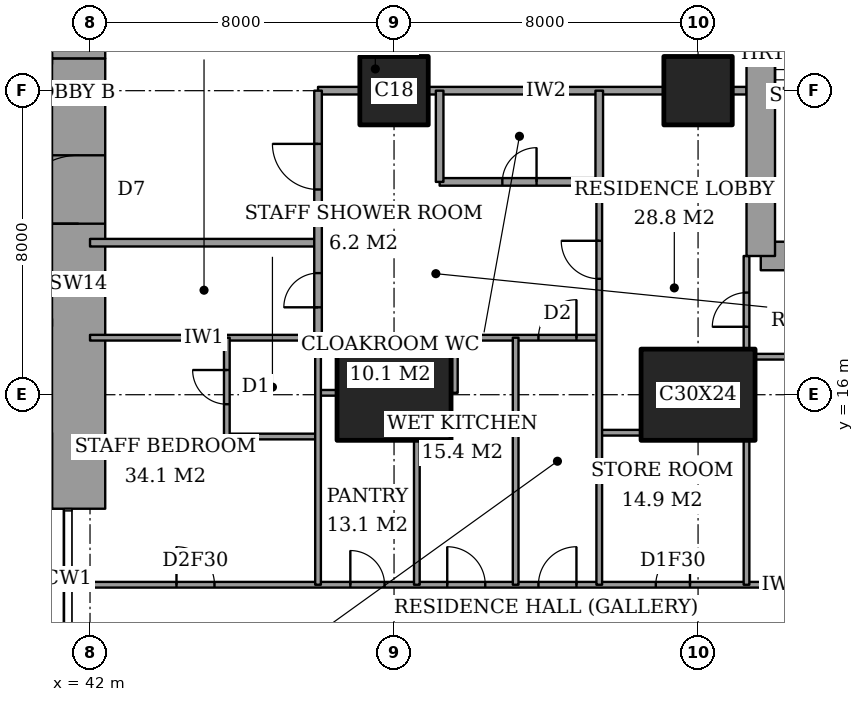
"""IFC4 building model, lengths in metres.
Left out: names, types, materials, properties, quantities, classifications, styles, units other than length and angle.
Written with IfcOpenShell. Run it as: python <this file> out.ifc"""

import sys

from ifc_helpers import new_model, si_unit, direction, frame, frame_2d, origin, origin_2d, place, context, subcontext, project, spatial, rectangle, extrude, element, fill, save


model = new_model("IFC4")
c1 = context("Model", 3, precision=1e-05, world=origin(), true_north=direction((0.0, 1.0)))
c2 = subcontext(c1, "Body", "Model", "MODEL_VIEW")
j1 = project(units=[si_unit("LENGTHUNIT", "METRE"), si_unit("PLANEANGLEUNIT", "RADIAN")], contexts=[c1])
p1 = place(None, origin())
s1 = spatial("IfcSite", under=j1, at=p1, CompositionType="ELEMENT")
p2 = place(p1, origin())
s2 = spatial("IfcBuilding", under=s1, at=p2, CompositionType="ELEMENT")
p3 = place(p2, frame((0.0, 0.0, 214.6)))
s3 = spatial("IfcBuildingStorey", under=s2, at=p3, CompositionType="ELEMENT", Elevation=214.6)
p4 = place(p3, frame((50.0, 16.0, 0.0), z_axis=(0.0, 0.0, 1.0), x_axis=(1.0, 0.0, 0.0)))
e1 = element("IfcColumn", 1, at=p4, inside=s3, PredefinedType="COLUMN", context=c2, shape_type="SweptSolid", body=[
    extrude(rectangle(XDim=3.0, YDim=2.4, at=origin_2d()), origin(), (0.0, 0.0, 1.0), 3.6),
])
p5 = place(p3, frame((50.0, 24.0, 0.0), z_axis=(0.0, 0.0, 1.0), x_axis=(1.0, 0.0, 0.0)))
e2 = element("IfcColumn", 2, at=p5, inside=s3, PredefinedType="COLUMN", context=c2, shape_type="SweptSolid", body=[
    extrude(rectangle(XDim=1.8, YDim=1.8, at=origin_2d()), origin(), (0.0, 0.0, 1.0), 3.6),
])
p6 = place(p3, frame((58.0, 16.0, 0.0), z_axis=(0.0, 0.0, 1.0), x_axis=(1.0, 0.0, 0.0)))
e3 = element("IfcColumn", 3, at=p6, inside=s3, PredefinedType="COLUMN", context=c2, shape_type="SweptSolid", body=[
    extrude(rectangle(XDim=3.0, YDim=2.4, at=origin_2d()), origin(), (0.0, 0.0, 1.0), 3.6),
])
p7 = place(p3, frame((58.0, 24.0, 0.0), z_axis=(0.0, 0.0, 1.0), x_axis=(1.0, 0.0, 0.0)))
e4 = element("IfcColumn", 4, at=p7, inside=s3, PredefinedType="COLUMN", context=c2, shape_type="SweptSolid", body=[
    extrude(rectangle(XDim=1.8, YDim=1.8, at=origin_2d()), origin(), (0.0, 0.0, 1.0), 3.6),
])
p8 = place(p3, frame((41.7, 13.0, 0.0), z_axis=(0.0, 0.0, 1.0), x_axis=(0.0, 1.0, 0.0)))
e5 = element("IfcWall", 5, at=p8, inside=s3, PredefinedType="SHEAR", context=c2, shape_type="SweptSolid", body=[
    extrude(rectangle(XDim=11.85, YDim=1.4, at=frame_2d((5.925, 0.0))), origin(), (0.0, 0.0, 1.0), 3.6),
])
p9 = place(p8, frame((7.5, 0.0, 0.0)))
e6 = element("IfcOpeningElement", 6, at=p9, cuts=e5, PredefinedType="OPENING", context=c2, shape_type="SweptSolid", body=[
    extrude(rectangle(XDim=1.8, YDim=2.4, at=frame_2d((0.9, 1.2))), frame((0.0, 0.71, 0.0), z_axis=(0.0, -1.0, 0.0), x_axis=(1.0, 0.0, 0.0)), (0.0, 0.0, 1.0), 1.42),
])
p10 = place(p3, frame((41.7, 24.85, 0.0), z_axis=(0.0, 0.0, 1.0), x_axis=(0.0, 1.0, 0.0)))
e7 = element("IfcWall", 7, at=p10, inside=s3, PredefinedType="SHEAR", context=c2, shape_type="SweptSolid", body=[
    extrude(rectangle(XDim=10.15, YDim=1.4, at=frame_2d((5.075, 0.0))), origin(), (0.0, 0.0, 1.0), 3.6),
])
p11 = place(p3, frame((59.65, 19.65, 0.0), z_axis=(0.0, 0.0, 1.0), x_axis=(1.0, 0.0, 0.0)))
e8 = element("IfcWall", 8, at=p11, inside=s3, PredefinedType="SHEAR", context=c2, shape_type="SweptSolid", body=[
    extrude(rectangle(XDim=4.45, YDim=0.75, at=frame_2d((2.225, 0.0))), origin(), (0.0, 0.0, 1.0), 3.6),
])
p12 = place(p3, frame((59.65, 28.35, 0.0), z_axis=(0.0, 0.0, 1.0), x_axis=(0.0, -1.0, 0.0)))
e9 = element("IfcWall", 9, at=p12, inside=s3, PredefinedType="SHEAR", context=c2, shape_type="SweptSolid", body=[
    extrude(rectangle(XDim=8.7, YDim=0.75, at=frame_2d((4.35, 0.0))), origin(), (0.0, 0.0, 1.0), 3.6),
])
p13 = place(p12, frame((0.975, 0.0, 0.0)))
e10 = element("IfcOpeningElement", 10, at=p13, cuts=e9, PredefinedType="OPENING", context=c2, shape_type="SweptSolid", body=[
    extrude(rectangle(XDim=1.0, YDim=2.1, at=frame_2d((0.5, 1.05))), frame((0.0, 0.385, 0.0), z_axis=(0.0, -1.0, 0.0), x_axis=(1.0, 0.0, 0.0)), (0.0, 0.0, 1.0), 0.77),
])
p14 = place(p3, frame((41.439, 11.0, 0.0), z_axis=(0.0, 0.0, 1.0), x_axis=(1.0, 0.0, 0.0)))
e11 = element("IfcWall", 11, at=p14, inside=s3, PredefinedType="PARTITIONING", context=c2, shape_type="SweptSolid", body=[
    extrude(rectangle(XDim=25.011, YDim=0.15, at=frame_2d((12.505, 0.0))), origin(), (0.0, 0.0, 1.0), 3.35),
])
p15 = place(p14, frame((12.361, 0.0, 0.0)))
e12 = element("IfcOpeningElement", 12, at=p15, cuts=e11, PredefinedType="OPENING", context=c2, shape_type="SweptSolid", body=[
    extrude(rectangle(XDim=1.0, YDim=2.1, at=frame_2d((0.5, 1.05))), frame((0.0, 0.085, 0.0), z_axis=(0.0, -1.0, 0.0), x_axis=(1.0, 0.0, 0.0)), (0.0, 0.0, 1.0), 0.17),
])
p16 = place(p14, frame((20.924, 0.0, 0.0)))
e13 = element("IfcOpeningElement", 13, at=p16, cuts=e11, PredefinedType="OPENING", context=c2, shape_type="SweptSolid", body=[
    extrude(rectangle(XDim=1.0, YDim=2.1, at=frame_2d((0.5, 1.05))), frame((0.0, 0.085, 0.0), z_axis=(0.0, -1.0, 0.0), x_axis=(1.0, 0.0, 0.0)), (0.0, 0.0, 1.0), 0.17),
])
p17 = place(p14, frame((15.448, 0.0, 0.0)))
e14 = element("IfcOpeningElement", 14, at=p17, cuts=e11, PredefinedType="OPENING", context=c2, shape_type="SweptSolid", body=[
    extrude(rectangle(XDim=0.9, YDim=2.1, at=frame_2d((0.45, 1.05))), frame((0.0, 0.085, 0.0), z_axis=(0.0, -1.0, 0.0), x_axis=(1.0, 0.0, 0.0)), (0.0, 0.0, 1.0), 0.17),
])
p18 = place(p14, frame((9.961, 0.0, 0.0)))
e15 = element("IfcOpeningElement", 15, at=p18, cuts=e11, PredefinedType="OPENING", context=c2, shape_type="SweptSolid", body=[
    extrude(rectangle(XDim=1.0, YDim=2.1, at=frame_2d((0.5, 1.05))), frame((0.0, 0.085, 0.0), z_axis=(0.0, -1.0, 0.0), x_axis=(1.0, 0.0, 0.0)), (0.0, 0.0, 1.0), 0.17),
])
p19 = place(p14, frame((7.411, 0.0, 0.0)))
e16 = element("IfcOpeningElement", 16, at=p19, cuts=e11, PredefinedType="OPENING", context=c2, shape_type="SweptSolid", body=[
    extrude(rectangle(XDim=0.9, YDim=2.1, at=frame_2d((0.45, 1.05))), frame((0.0, 0.085, 0.0), z_axis=(0.0, -1.0, 0.0), x_axis=(1.0, 0.0, 0.0)), (0.0, 0.0, 1.0), 0.17),
])
p20 = place(p14, frame((2.836, 0.0, 0.0)))
e17 = element("IfcOpeningElement", 17, at=p20, cuts=e11, PredefinedType="OPENING", context=c2, shape_type="SweptSolid", body=[
    extrude(rectangle(XDim=1.0, YDim=2.1, at=frame_2d((0.5, 1.05))), frame((0.0, 0.085, 0.0), z_axis=(0.0, -1.0, 0.0), x_axis=(1.0, 0.0, 0.0)), (0.0, 0.0, 1.0), 0.17),
])
p21 = place(p3, frame((45.6, 14.9, 0.0), z_axis=(0.0, 0.0, 1.0), x_axis=(1.0, 0.0, 0.0)))
e18 = element("IfcWall", 18, at=p21, inside=s3, PredefinedType="PARTITIONING", context=c2, shape_type="SweptSolid", body=[
    extrude(rectangle(XDim=2.4, YDim=0.15, at=frame_2d((1.2, 0.0))), origin(), (0.0, 0.0, 1.0), 3.35),
])
p22 = place(p3, frame((55.4, 15.0, 0.0), z_axis=(0.0, 0.0, 1.0), x_axis=(1.0, 0.0, 0.0)))
e19 = element("IfcWall", 19, at=p22, inside=s3, PredefinedType="PARTITIONING", context=c2, shape_type="SweptSolid", body=[
    extrude(rectangle(XDim=1.1, YDim=0.15, at=frame_2d((0.55, 0.0))), origin(), (0.0, 0.0, 1.0), 3.35),
])
p23 = place(p3, frame((48.0, 16.05, 0.0), z_axis=(0.0, 0.0, 1.0), x_axis=(1.0, 0.0, 0.0)))
e20 = element("IfcWall", 20, at=p23, inside=s3, PredefinedType="PARTITIONING", context=c2, shape_type="SweptSolid", body=[
    extrude(rectangle(XDim=0.5, YDim=0.15, at=frame_2d((0.25, 0.0))), origin(), (0.0, 0.0, 1.0), 2.634),
])
p24 = place(p3, frame((59.5, 17.0, 0.0), z_axis=(0.0, 0.0, 1.0), x_axis=(1.0, 0.0, 0.0)))
e21 = element("IfcWall", 21, at=p24, inside=s3, PredefinedType="PARTITIONING", context=c2, shape_type="SweptSolid", body=[
    extrude(rectangle(XDim=6.95, YDim=0.15, at=frame_2d((3.475, 0.0))), origin(), (0.0, 0.0, 1.0), 3.35),
])
p25 = place(p3, frame((42.0, 17.5, 0.0), z_axis=(0.0, 0.0, 1.0), x_axis=(1.0, 0.0, 0.0)))
e22 = element("IfcWall", 22, at=p25, inside=s3, PredefinedType="PARTITIONING", context=c2, shape_type="SweptSolid", body=[
    extrude(rectangle(XDim=6.0, YDim=0.15, at=frame_2d((3.0, 0.0))), origin(), (0.0, 0.0, 1.0), 3.35),
])
p26 = place(p3, frame((51.6, 17.5, 0.0), z_axis=(0.0, 0.0, 1.0), x_axis=(1.0, 0.0, 0.0)))
e23 = element("IfcWall", 23, at=p26, inside=s3, PredefinedType="PARTITIONING", context=c2, shape_type="SweptSolid", body=[
    extrude(rectangle(XDim=3.8, YDim=0.15, at=frame_2d((1.9, 0.0))), origin(), (0.0, 0.0, 1.0), 3.35),
])
p27 = place(p26, frame((2.2, 0.0, 0.0)))
e24 = element("IfcOpeningElement", 24, at=p27, cuts=e23, PredefinedType="OPENING", context=c2, shape_type="SweptSolid", body=[
    extrude(rectangle(XDim=1.0, YDim=2.1, at=frame_2d((0.5, 1.05))), frame((0.0, 0.085, 0.0), z_axis=(0.0, -1.0, 0.0), x_axis=(1.0, 0.0, 0.0)), (0.0, 0.0, 1.0), 0.17),
])
p28 = place(p3, frame((42.0, 20.0, 0.0), z_axis=(0.0, 0.0, 1.0), x_axis=(1.0, 0.0, 0.0)))
e25 = element("IfcWall", 25, at=p28, inside=s3, PredefinedType="PARTITIONING", context=c2, shape_type="SweptSolid", body=[
    extrude(rectangle(XDim=6.0, YDim=0.2, at=frame_2d((3.0, 0.0))), origin(), (0.0, 0.0, 1.0), 3.35),
])
p29 = place(p3, frame((51.2, 21.6, 0.0), z_axis=(0.0, 0.0, 1.0), x_axis=(1.0, 0.0, 0.0)))
e26 = element("IfcWall", 26, at=p29, inside=s3, PredefinedType="PARTITIONING", context=c2, shape_type="SweptSolid", body=[
    extrude(rectangle(XDim=4.2, YDim=0.2, at=frame_2d((2.1, 0.0))), origin(), (0.0, 0.0, 1.0), 3.35),
])
p30 = place(p29, frame((1.65, 0.0, 0.0)))
e27 = element("IfcOpeningElement", 27, at=p30, cuts=e26, PredefinedType="OPENING", context=c2, shape_type="SweptSolid", body=[
    extrude(rectangle(XDim=0.9, YDim=2.1, at=frame_2d((0.45, 1.05))), frame((0.0, 0.11, 0.0), z_axis=(0.0, -1.0, 0.0), x_axis=(1.0, 0.0, 0.0)), (0.0, 0.0, 1.0), 0.22),
])
p31 = place(p3, frame((48.0, 24.0, 0.0), z_axis=(0.0, 0.0, 1.0), x_axis=(1.0, 0.0, 0.0)))
e28 = element("IfcWall", 28, at=p31, inside=s3, PredefinedType="PARTITIONING", context=c2, shape_type="SweptSolid", body=[
    extrude(rectangle(XDim=1.1, YDim=0.2, at=frame_2d((0.55, 0.0))), origin(), (0.0, 0.0, 1.0), 3.35),
])
p32 = place(p3, frame((50.9, 24.0, 0.0), z_axis=(0.0, 0.0, 1.0), x_axis=(1.0, 0.0, 0.0)))
e29 = element("IfcWall", 29, at=p32, inside=s3, PredefinedType="PARTITIONING", context=c2, shape_type="SweptSolid", body=[
    extrude(rectangle(XDim=6.2, YDim=0.2, at=frame_2d((3.1, 0.0))), origin(), (0.0, 0.0, 1.0), 3.35),
])
p33 = place(p3, frame((58.9, 24.0, 0.0), z_axis=(0.0, 0.0, 1.0), x_axis=(1.0, 0.0, 0.0)))
e30 = element("IfcWall", 30, at=p33, inside=s3, PredefinedType="PARTITIONING", context=c2, shape_type="SweptSolid", body=[
    extrude(rectangle(XDim=0.375, YDim=0.2, at=frame_2d((0.188, 0.0))), origin(), (0.0, 0.0, 1.0), 3.35),
])
p34 = place(p3, frame((45.6, 14.9, 0.0), z_axis=(0.0, 0.0, 1.0), x_axis=(0.0, 1.0, 0.0)))
e31 = element("IfcWall", 31, at=p34, inside=s3, PredefinedType="PARTITIONING", context=c2, shape_type="SweptSolid", body=[
    extrude(rectangle(XDim=2.6, YDim=0.15, at=frame_2d((1.3, 0.0))), origin(), (0.0, 0.0, 1.0), 3.35),
])
p35 = place(p34, frame((0.85, 0.0, 0.0)))
e32 = element("IfcOpeningElement", 32, at=p35, cuts=e31, PredefinedType="OPENING", context=c2, shape_type="SweptSolid", body=[
    extrude(rectangle(XDim=0.9, YDim=2.1, at=frame_2d((0.45, 1.05))), frame((0.0, 0.085, 0.0), z_axis=(0.0, -1.0, 0.0), x_axis=(1.0, 0.0, 0.0)), (0.0, 0.0, 1.0), 0.17),
])
p36 = place(p3, frame((48.0, 17.5, 0.0), z_axis=(0.0, 0.0, 1.0), x_axis=(0.0, 1.0, 0.0)))
e33 = element("IfcWall", 33, at=p36, inside=s3, PredefinedType="PARTITIONING", context=c2, shape_type="SweptSolid", body=[
    extrude(rectangle(XDim=6.5, YDim=0.2, at=frame_2d((3.25, 0.0))), origin(), (0.0, 0.0, 1.0), 3.35),
])
p37 = place(p36, frame((3.9, 0.0, 0.0)))
e34 = element("IfcOpeningElement", 34, at=p37, cuts=e33, PredefinedType="OPENING", context=c2, shape_type="SweptSolid", body=[
    extrude(rectangle(XDim=1.2, YDim=2.4, at=frame_2d((0.6, 1.2))), frame((0.0, 0.11, 0.0), z_axis=(0.0, -1.0, 0.0), x_axis=(1.0, 0.0, 0.0)), (0.0, 0.0, 1.0), 0.22),
])
p38 = place(p36, frame((0.8, 0.0, 0.0)))
e35 = element("IfcOpeningElement", 35, at=p38, cuts=e33, PredefinedType="OPENING", context=c2, shape_type="SweptSolid", body=[
    extrude(rectangle(XDim=0.9, YDim=2.1, at=frame_2d((0.45, 1.05))), frame((0.0, 0.11, 0.0), z_axis=(0.0, -1.0, 0.0), x_axis=(1.0, 0.0, 0.0)), (0.0, 0.0, 1.0), 0.22),
])
p39 = place(p3, frame((48.0, 11.0, 0.0), z_axis=(0.0, 0.0, 1.0), x_axis=(0.0, 1.0, 0.0)))
e36 = element("IfcWall", 36, at=p39, inside=s3, PredefinedType="PARTITIONING", context=c2, shape_type="SweptSolid", body=[
    extrude(rectangle(XDim=6.5, YDim=0.15, at=frame_2d((3.25, 0.0))), origin(), (0.0, 0.0, 1.0), 3.35),
])
p40 = place(p3, frame((50.6, 11.0, 0.0), z_axis=(0.0, 0.0, 1.0), x_axis=(0.0, 1.0, 0.0)))
e37 = element("IfcWall", 37, at=p40, inside=s3, PredefinedType="PARTITIONING", context=c2, shape_type="SweptSolid", body=[
    extrude(rectangle(XDim=3.8, YDim=0.15, at=frame_2d((1.9, 0.0))), origin(), (0.0, 0.0, 1.0), 3.35),
])
p41 = place(p3, frame((51.2, 21.6, 0.0), z_axis=(0.0, 0.0, 1.0), x_axis=(0.0, 1.0, 0.0)))
e38 = element("IfcWall", 38, at=p41, inside=s3, PredefinedType="PARTITIONING", context=c2, shape_type="SweptSolid", body=[
    extrude(rectangle(XDim=2.4, YDim=0.2, at=frame_2d((1.2, 0.0))), origin(), (0.0, 0.0, 1.0), 3.35),
])
p42 = place(p3, frame((51.6, 16.05, 0.0), z_axis=(0.0, 0.0, 1.0), x_axis=(0.0, 1.0, 0.0)))
e39 = element("IfcWall", 39, at=p42, inside=s3, PredefinedType="PARTITIONING", context=c2, shape_type="SweptSolid", body=[
    extrude(rectangle(XDim=1.45, YDim=0.15, at=frame_2d((0.725, 0.0))), origin(), (0.0, 0.0, 1.0), 3.35),
])
p43 = place(p3, frame((53.2, 11.0, 0.0), z_axis=(0.0, 0.0, 1.0), x_axis=(0.0, 1.0, 0.0)))
e40 = element("IfcWall", 40, at=p43, inside=s3, PredefinedType="PARTITIONING", context=c2, shape_type="SweptSolid", body=[
    extrude(rectangle(XDim=6.5, YDim=0.15, at=frame_2d((3.25, 0.0))), origin(), (0.0, 0.0, 1.0), 3.35),
])
p44 = place(p3, frame((55.4, 21.6, 0.0), z_axis=(0.0, 0.0, 1.0), x_axis=(0.0, 1.0, 0.0)))
e41 = element("IfcWall", 41, at=p44, inside=s3, PredefinedType="PARTITIONING", context=c2, shape_type="SweptSolid", body=[
    extrude(rectangle(XDim=2.4, YDim=0.2, at=frame_2d((1.2, 0.0))), origin(), (0.0, 0.0, 1.0), 3.35),
])
p45 = place(p3, frame((55.4, 11.0, 0.0), z_axis=(0.0, 0.0, 1.0), x_axis=(0.0, 1.0, 0.0)))
e42 = element("IfcWall", 42, at=p45, inside=s3, PredefinedType="PARTITIONING", context=c2, shape_type="SweptSolid", body=[
    extrude(rectangle(XDim=10.6, YDim=0.15, at=frame_2d((5.3, 0.0))), origin(), (0.0, 0.0, 1.0), 3.35),
])
p46 = place(p45, frame((8.05, 0.0, 0.0)))
e43 = element("IfcOpeningElement", 43, at=p46, cuts=e42, PredefinedType="OPENING", context=c2, shape_type="SweptSolid", body=[
    extrude(rectangle(XDim=1.0, YDim=2.1, at=frame_2d((0.5, 1.05))), frame((0.0, 0.085, 0.0), z_axis=(0.0, -1.0, 0.0), x_axis=(1.0, 0.0, 0.0)), (0.0, 0.0, 1.0), 0.17),
])
p47 = place(p3, frame((59.275, 11.0, 0.0), z_axis=(0.0, 0.0, 1.0), x_axis=(0.0, 1.0, 0.0)))
e44 = element("IfcWall", 44, at=p47, inside=s3, PredefinedType="PARTITIONING", context=c2, shape_type="SweptSolid", body=[
    extrude(rectangle(XDim=3.8, YDim=0.15, at=frame_2d((1.9, 0.0))), origin(), (0.0, 0.0, 1.0), 3.35),
])
p48 = place(p3, frame((59.275, 17.2, 0.0), z_axis=(0.0, 0.0, 1.0), x_axis=(0.0, 1.0, 0.0)))
e45 = element("IfcWall", 45, at=p48, inside=s3, PredefinedType="PARTITIONING", context=c2, shape_type="SweptSolid", body=[
    extrude(rectangle(XDim=2.45, YDim=0.15, at=frame_2d((1.225, 0.0))), origin(), (0.0, 0.0, 1.0), 3.35),
])
p49 = place(p48, frame((0.587, 0.0, 0.0)))
e46 = element("IfcOpeningElement", 46, at=p49, cuts=e45, PredefinedType="OPENING", context=c2, shape_type="SweptSolid", body=[
    extrude(rectangle(XDim=0.9, YDim=2.1, at=frame_2d((0.45, 1.05))), frame((0.0, 0.085, 0.0), z_axis=(0.0, -1.0, 0.0), x_axis=(1.0, 0.0, 0.0)), (0.0, 0.0, 1.0), 0.17),
])
p50 = place(p3, frame((28.3, 17.9, 0.0), z_axis=(0.0, 0.0, 1.0), x_axis=(1.0, 0.0, 0.0)))
e47 = element("IfcWall", 47, at=p50, inside=s3, PredefinedType="PARTITIONING", context=c2, shape_type="SweptSolid", body=[
    extrude(rectangle(XDim=12.7, YDim=0.2, at=frame_2d((6.35, 0.0))), origin(), (0.0, 0.0, 1.0), 3.6),
])
p51 = place(p50, frame((1.05, 0.0, 0.0)))
e48 = element("IfcOpeningElement", 48, at=p51, cuts=e47, PredefinedType="OPENING", context=c2, shape_type="SweptSolid", body=[
    extrude(rectangle(XDim=0.9, YDim=2.1, at=frame_2d((0.45, 1.05))), frame((0.0, 0.11, 0.0), z_axis=(0.0, -1.0, 0.0), x_axis=(1.0, 0.0, 0.0)), (0.0, 0.0, 1.0), 0.22),
])
p52 = place(p50, frame((4.2, 0.0, 0.0)))
e49 = element("IfcOpeningElement", 49, at=p52, cuts=e47, PredefinedType="OPENING", context=c2, shape_type="SweptSolid", body=[
    extrude(rectangle(XDim=1.0, YDim=2.1, at=frame_2d((0.5, 1.05))), frame((0.0, 0.11, 0.0), z_axis=(0.0, -1.0, 0.0), x_axis=(1.0, 0.0, 0.0)), (0.0, 0.0, 1.0), 0.22),
])
p53 = place(p50, frame((10.6, 0.0, 0.0)))
e50 = element("IfcOpeningElement", 50, at=p53, cuts=e47, PredefinedType="OPENING", context=c2, shape_type="SweptSolid", body=[
    extrude(rectangle(XDim=1.2, YDim=2.1, at=frame_2d((0.6, 1.05))), frame((0.0, 0.11, 0.0), z_axis=(0.0, -1.0, 0.0), x_axis=(1.0, 0.0, 0.0)), (0.0, 0.0, 1.0), 0.22),
])
p54 = place(p15, origin())
e51 = element("IfcDoor", 51, at=p54, inside=s3, OperationType="SINGLE_SWING_LEFT", PredefinedType="DOOR", context=c2, shape_type="SweptSolid", body=[
    extrude(rectangle(XDim=1.0, YDim=2.1, at=frame_2d((0.5, 1.05))), frame((0.0, 0.025, 0.0), z_axis=(0.0, -1.0, 0.0), x_axis=(1.0, 0.0, 0.0)), (0.0, 0.0, 1.0), 0.05),
])
fill(e12, e51)
p55 = place(p49, origin())
e52 = element("IfcDoor", 52, at=p55, inside=s3, OperationType="SINGLE_SWING_RIGHT", PredefinedType="DOOR", context=c2, shape_type="SweptSolid", body=[
    extrude(rectangle(XDim=0.9, YDim=2.1, at=frame_2d((0.45, 1.05))), frame((0.0, 0.025, 0.0), z_axis=(0.0, -1.0, 0.0), x_axis=(1.0, 0.0, 0.0)), (0.0, 0.0, 1.0), 0.05),
])
fill(e46, e52)
p56 = place(p17, origin())
e53 = element("IfcDoor", 53, at=p56, inside=s3, OperationType="SINGLE_SWING_LEFT", PredefinedType="DOOR", context=c2, shape_type="SweptSolid", body=[
    extrude(rectangle(XDim=0.9, YDim=2.1, at=frame_2d((0.45, 1.05))), frame((0.0, 0.025, 0.0), z_axis=(0.0, -1.0, 0.0), x_axis=(1.0, 0.0, 0.0)), (0.0, 0.0, 1.0), 0.05),
])
fill(e14, e53)
p57 = place(p46, origin())
e54 = element("IfcDoor", 54, at=p57, inside=s3, OperationType="SINGLE_SWING_LEFT", PredefinedType="DOOR", context=c2, shape_type="SweptSolid", body=[
    extrude(rectangle(XDim=1.0, YDim=2.1, at=frame_2d((0.5, 1.05))), frame((0.0, 0.025, 0.0), z_axis=(0.0, -1.0, 0.0), x_axis=(1.0, 0.0, 0.0)), (0.0, 0.0, 1.0), 0.05),
])
fill(e43, e54)
p58 = place(p30, origin())
e55 = element("IfcDoor", 55, at=p58, inside=s3, OperationType="SINGLE_SWING_LEFT", PredefinedType="DOOR", context=c2, shape_type="SweptSolid", body=[
    extrude(rectangle(XDim=0.9, YDim=2.1, at=frame_2d((0.45, 1.05))), frame((0.0, 0.025, 0.0), z_axis=(0.0, -1.0, 0.0), x_axis=(1.0, 0.0, 0.0)), (0.0, 0.0, 1.0), 0.05),
])
fill(e27, e55)
p59 = place(p37, origin())
e56 = element("IfcDoor", 56, at=p59, inside=s3, OperationType="SINGLE_SWING_LEFT", PredefinedType="DOOR", context=c2, shape_type="SweptSolid", body=[
    extrude(rectangle(XDim=1.2, YDim=2.4, at=frame_2d((0.6, 1.2))), frame((0.0, 0.025, 0.0), z_axis=(0.0, -1.0, 0.0), x_axis=(1.0, 0.0, 0.0)), (0.0, 0.0, 1.0), 0.05),
])
fill(e34, e56)
p60 = place(p27, origin())
e57 = element("IfcDoor", 57, at=p60, inside=s3, OperationType="SINGLE_SWING_LEFT", PredefinedType="DOOR", context=c2, shape_type="SweptSolid", body=[
    extrude(rectangle(XDim=1.0, YDim=2.1, at=frame_2d((0.5, 1.05))), frame((0.0, 0.025, 0.0), z_axis=(0.0, -1.0, 0.0), x_axis=(1.0, 0.0, 0.0)), (0.0, 0.0, 1.0), 0.05),
])
fill(e24, e57)
p61 = place(p18, origin())
e58 = element("IfcDoor", 58, at=p61, inside=s3, OperationType="SINGLE_SWING_RIGHT", PredefinedType="DOOR", context=c2, shape_type="SweptSolid", body=[
    extrude(rectangle(XDim=1.0, YDim=2.1, at=frame_2d((0.5, 1.05))), frame((0.0, 0.025, 0.0), z_axis=(0.0, -1.0, 0.0), x_axis=(1.0, 0.0, 0.0)), (0.0, 0.0, 1.0), 0.05),
])
fill(e15, e58)
p62 = place(p19, origin())
e59 = element("IfcDoor", 59, at=p62, inside=s3, OperationType="SINGLE_SWING_RIGHT", PredefinedType="DOOR", context=c2, shape_type="SweptSolid", body=[
    extrude(rectangle(XDim=0.9, YDim=2.1, at=frame_2d((0.45, 1.05))), frame((0.0, 0.025, 0.0), z_axis=(0.0, -1.0, 0.0), x_axis=(1.0, 0.0, 0.0)), (0.0, 0.0, 1.0), 0.05),
])
fill(e16, e59)
p63 = place(p35, origin())
e60 = element("IfcDoor", 60, at=p63, inside=s3, OperationType="SINGLE_SWING_LEFT", PredefinedType="DOOR", context=c2, shape_type="SweptSolid", body=[
    extrude(rectangle(XDim=0.9, YDim=2.1, at=frame_2d((0.45, 1.05))), frame((0.0, 0.025, 0.0), z_axis=(0.0, -1.0, 0.0), x_axis=(1.0, 0.0, 0.0)), (0.0, 0.0, 1.0), 0.05),
])
fill(e32, e60)
p64 = place(p20, origin())
e61 = element("IfcDoor", 61, at=p64, inside=s3, OperationType="SINGLE_SWING_RIGHT", PredefinedType="DOOR", context=c2, shape_type="SweptSolid", body=[
    extrude(rectangle(XDim=1.0, YDim=2.1, at=frame_2d((0.5, 1.05))), frame((0.0, 0.025, 0.0), z_axis=(0.0, -1.0, 0.0), x_axis=(1.0, 0.0, 0.0)), (0.0, 0.0, 1.0), 0.05),
])
fill(e17, e61)
p65 = place(p38, origin())
e62 = element("IfcDoor", 62, at=p65, inside=s3, OperationType="SINGLE_SWING_RIGHT", PredefinedType="DOOR", context=c2, shape_type="SweptSolid", body=[
    extrude(rectangle(XDim=0.9, YDim=2.1, at=frame_2d((0.45, 1.05))), frame((0.0, 0.025, 0.0), z_axis=(0.0, -1.0, 0.0), x_axis=(1.0, 0.0, 0.0)), (0.0, 0.0, 1.0), 0.05),
])
fill(e35, e62)
p66 = place(p9, origin())
e63 = element("IfcDoor", 63, at=p66, inside=s3, OperationType="DOUBLE_DOOR_DOUBLE_SWING", PredefinedType="DOOR", context=c2, shape_type="SweptSolid", body=[
    extrude(rectangle(XDim=1.8, YDim=2.4, at=frame_2d((0.9, 1.2))), frame((0.0, 0.025, 0.0), z_axis=(0.0, -1.0, 0.0), x_axis=(1.0, 0.0, 0.0)), (0.0, 0.0, 1.0), 0.05),
])
fill(e6, e63)
save(model, sys.argv[1])
